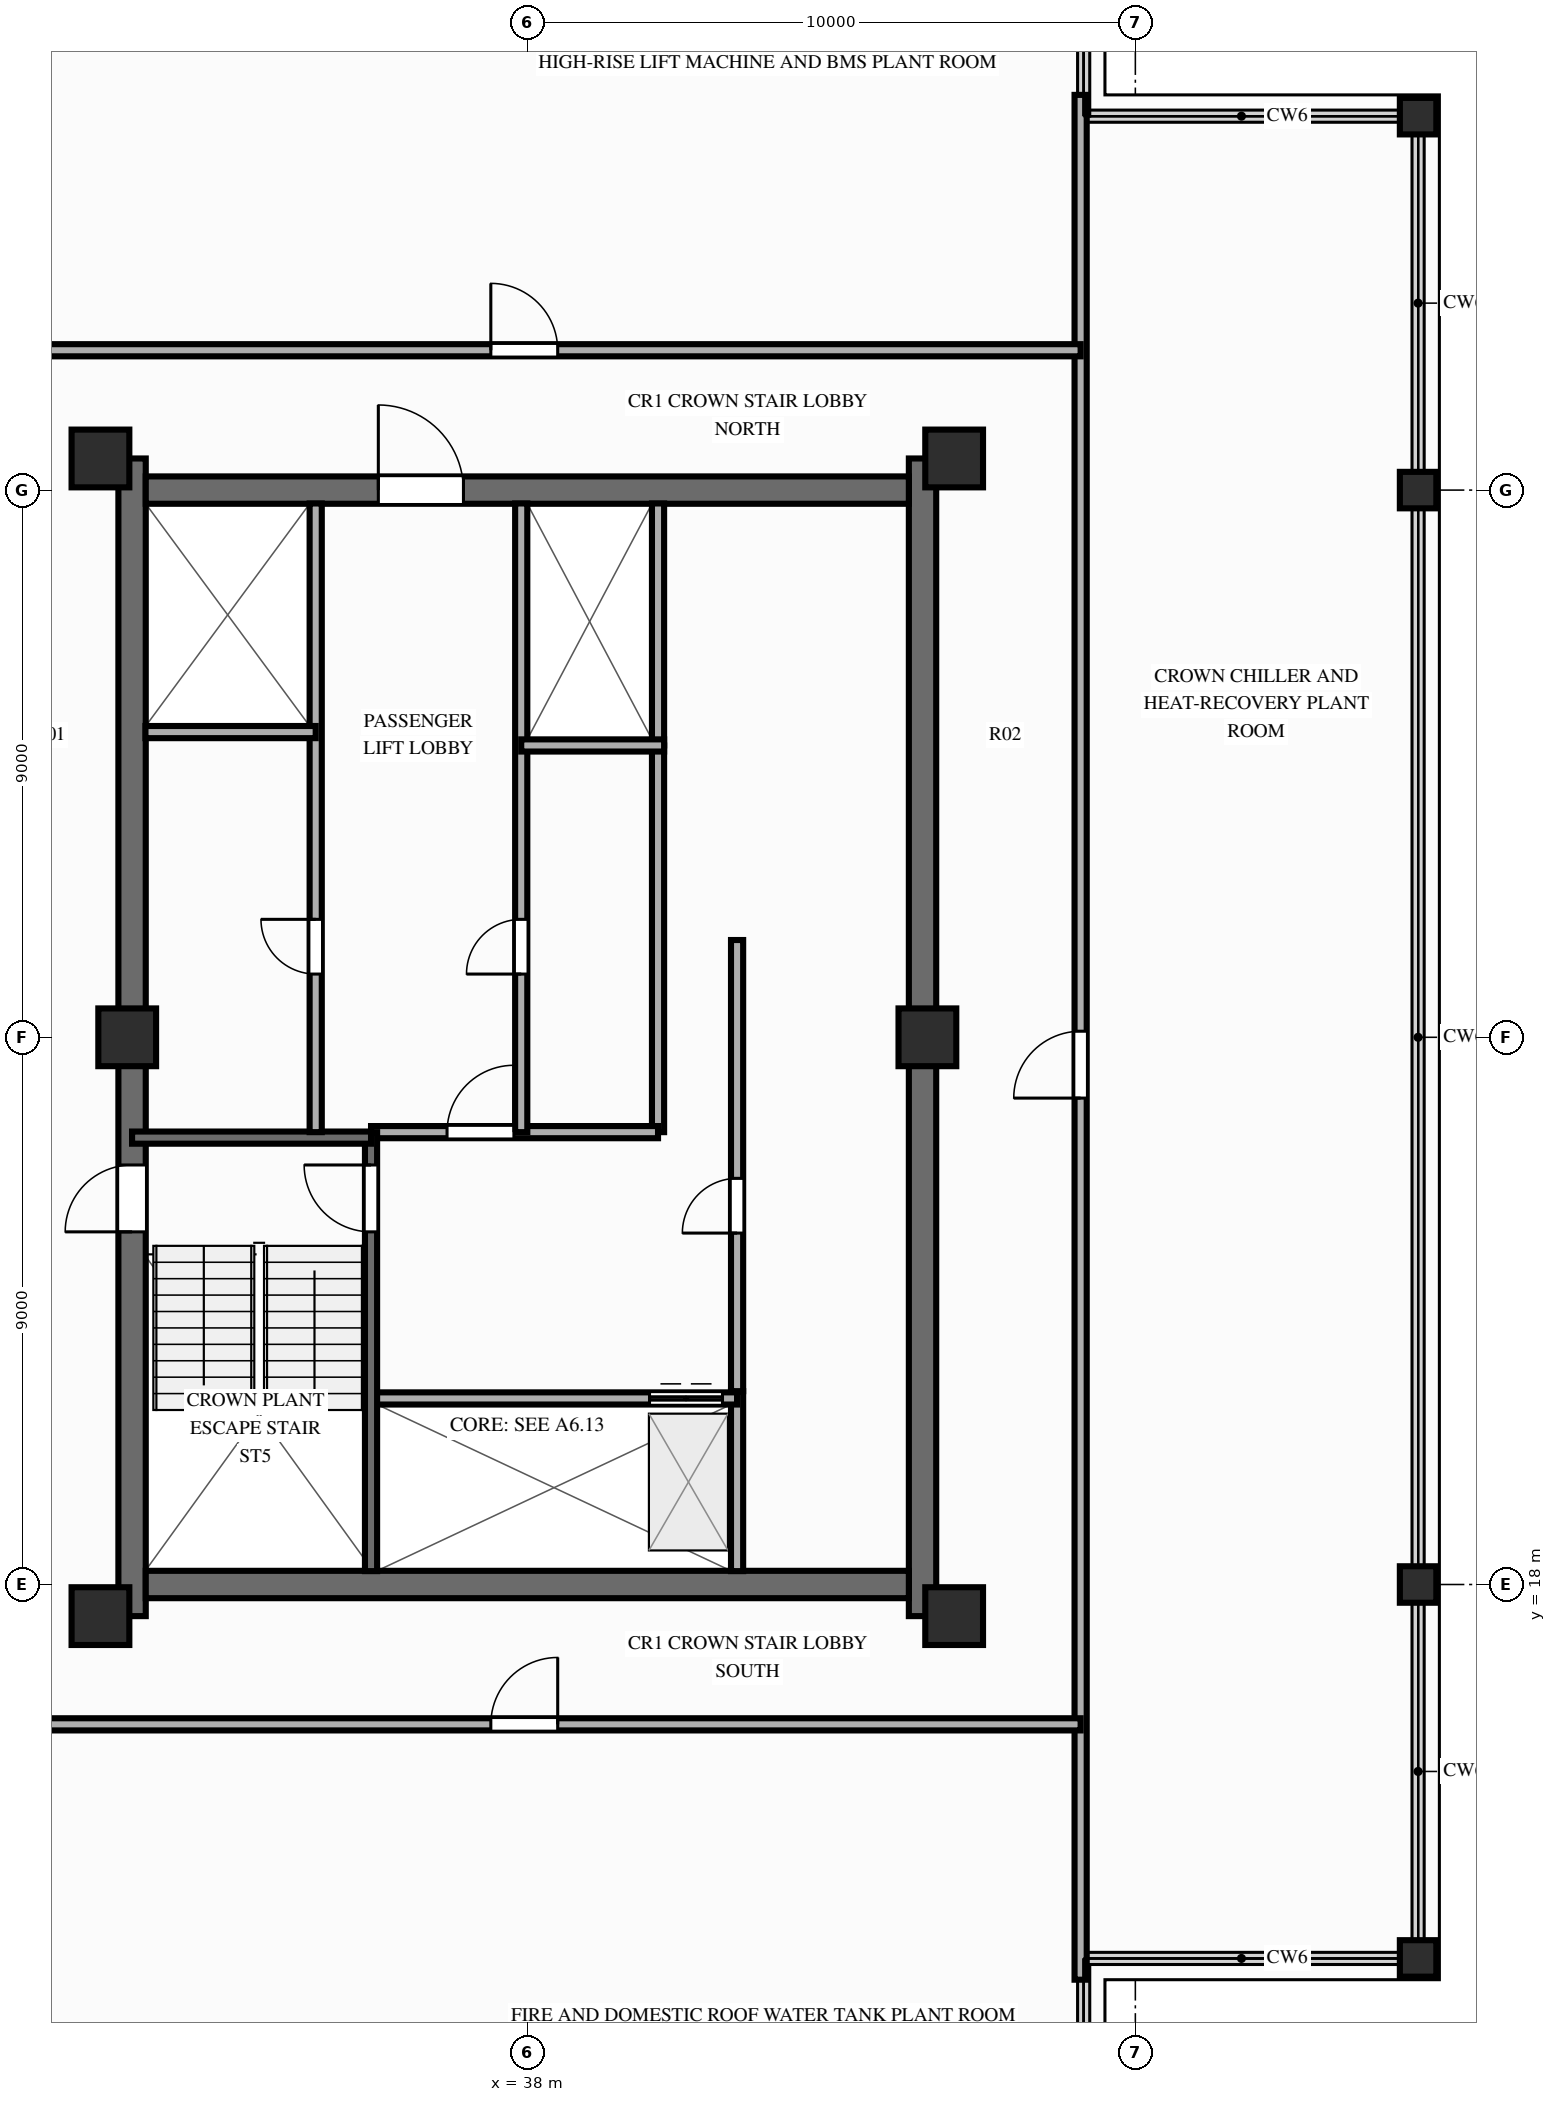
"""IFC4 building model, lengths in metres.
Left out: names, types, materials, properties, quantities, classifications, styles, units other than length and angle.
Written with IfcOpenShell. Run it as: python <this file> out.ifc"""

import sys

from ifc_helpers import new_model, si_unit, direction, frame, frame_2d, origin, origin_2d, place, context, subcontext, project, spatial, rectangle, extrude, source, transform, mapped, element, fill, save


model = new_model("IFC4")
c1 = context("Model", 3, precision=1e-05, world=origin(), true_north=direction((0.0, 1.0)))
c2 = subcontext(c1, "Body", "Model", "MODEL_VIEW")
j1 = project(units=[si_unit("LENGTHUNIT", "METRE"), si_unit("PLANEANGLEUNIT", "RADIAN")], contexts=[c1])
p1 = place(None, origin())
s1 = spatial("IfcSite", under=j1, at=p1, CompositionType="ELEMENT")
p2 = place(p1, origin())
s2 = spatial("IfcBuilding", under=s1, at=p2, CompositionType="ELEMENT")
p3 = place(p2, frame((0.0, 0.0, 252.2)))
s3 = spatial("IfcBuildingStorey", under=s2, at=p3, CompositionType="ELEMENT", Elevation=252.2)
p4 = place(p3, frame((31.5, 17.48, 0.0), z_axis=(0.0, 0.0, 1.0), x_axis=(0.0, 1.0, 0.0)))
e1 = element("IfcWall", 1, at=p4, inside=s3, PredefinedType="SHEAR", context=c2, shape_type="SweptSolid", body=[
    extrude(rectangle(XDim=19.04, YDim=0.45, at=frame_2d((9.52, 0.0))), origin(), (0.0, 0.0, 1.0), 3.8),
])
p5 = place(p4, frame((6.32, 0.0, 0.0)))
e2 = element("IfcOpeningElement", 2, at=p5, cuts=e1, PredefinedType="OPENING", context=c2, shape_type="SweptSolid", body=[
    extrude(rectangle(XDim=1.1, YDim=2.15, at=frame_2d((0.55, 1.075))), frame((0.0, 0.237, 0.0), z_axis=(0.0, -1.0, 0.0), x_axis=(1.0, 0.0, 0.0)), (0.0, 0.0, 1.0), 0.474),
])
p6 = place(p3, frame((44.5, 17.48, 0.0), z_axis=(0.0, 0.0, 1.0), x_axis=(0.0, 1.0, 0.0)))
e3 = element("IfcWall", 3, at=p6, inside=s3, PredefinedType="SHEAR", context=c2, shape_type="SweptSolid", body=[
    extrude(rectangle(XDim=19.04, YDim=0.45, at=frame_2d((9.52, 0.0))), origin(), (0.0, 0.0, 1.0), 3.8),
])
p7 = place(p3, frame((31.725, 18.0, 0.0), z_axis=(0.0, 0.0, 1.0), x_axis=(1.0, 0.0, 0.0)))
e4 = element("IfcWall", 4, at=p7, inside=s3, PredefinedType="SHEAR", context=c2, shape_type="SweptSolid", body=[
    extrude(rectangle(XDim=12.55, YDim=0.45, at=frame_2d((6.275, 0.0))), origin(), (0.0, 0.0, 1.0), 3.8),
])
p8 = place(p3, frame((31.725, 36.0, 0.0), z_axis=(0.0, 0.0, 1.0), x_axis=(1.0, 0.0, 0.0)))
e5 = element("IfcWall", 5, at=p8, inside=s3, PredefinedType="SHEAR", context=c2, shape_type="SweptSolid", body=[
    extrude(rectangle(XDim=12.55, YDim=0.45, at=frame_2d((6.275, 0.0))), origin(), (0.0, 0.0, 1.0), 3.8),
])
p9 = place(p8, frame((5.225, 0.0, 0.0), z_axis=(0.0, 0.0, 1.0), x_axis=(-1.0, 0.0, 0.0)))
e6 = element("IfcOpeningElement", 6, at=p9, cuts=e5, PredefinedType="OPENING", context=c2, shape_type="SweptSolid", body=[
    extrude(rectangle(XDim=1.4, YDim=2.15, at=frame_2d((0.7, 1.075))), frame((0.0, 0.237, 0.0), z_axis=(0.0, -1.0, 0.0), x_axis=(1.0, 0.0, 0.0)), (0.0, 0.0, 1.0), 0.474),
])
m1 = source(origin(), c2, "Body", "SweptSolid", [
    extrude(rectangle(XDim=0.95, YDim=0.95, at=origin_2d()), origin(), (0.0, 0.0, 1.0), 3.8),
])
for number, where, z_axis, x_axis in (
    (7, (30.98, 17.48, 0.0), (0.0, 0.0, 1.0), (1.0, 0.0, 0.0)),
    (8, (45.02, 17.48, 0.0), (0.0, 0.0, 1.0), (1.0, 0.0, 0.0)),
    (9, (30.98, 36.52, 0.0), (0.0, 0.0, 1.0), (1.0, 0.0, 0.0)),
    (10, (45.02, 36.52, 0.0), (0.0, 0.0, 1.0), (1.0, 0.0, 0.0)),
    (11, (31.42, 27.0, 0.0), (0.0, 0.0, 1.0), (1.0, 0.0, 0.0)),
    (12, (44.58, 27.0, 0.0), (0.0, 0.0, 1.0), (1.0, 0.0, 0.0)),
):
    element("IfcColumn", number, at=place(p3, frame(where, z_axis=z_axis, x_axis=x_axis)), inside=s3, PredefinedType="COLUMN", context=c2, shape_type="MappedRepresentation", body=[
        mapped(m1, transform((0.0, 0.0, 0.0), scale=1.0)),
    ])
m2 = source(origin(), c2, "Body", "SweptSolid", [
    extrude(rectangle(XDim=0.6, YDim=0.6, at=origin_2d()), origin(), (0.0, 0.0, 1.0), 3.8),
])
for number, where, z_axis, x_axis in (
    (13, (52.65, 11.85, 0.0), (0.0, 0.0, 1.0), (1.0, 0.0, 0.0)),
    (14, (52.65, 18.0, 0.0), (0.0, 0.0, 1.0), (1.0, 0.0, 0.0)),
    (15, (52.65, 36.0, 0.0), (0.0, 0.0, 1.0), (1.0, 0.0, 0.0)),
    (16, (52.65, 42.15, 0.0), (0.0, 0.0, 1.0), (1.0, 0.0, 0.0)),
):
    element("IfcColumn", number, at=place(p3, frame(where, z_axis=z_axis, x_axis=x_axis)), inside=s3, PredefinedType="COLUMN", context=c2, shape_type="MappedRepresentation", body=[
        mapped(m2, transform((0.0, 0.0, 0.0), scale=1.0)),
    ])
p10 = place(p3, frame((41.45, 18.22, 0.0), z_axis=(0.0, 0.0, 1.0), x_axis=(0.0, 1.0, 0.0)))
e17 = element("IfcWall", 17, at=p10, inside=s3, PredefinedType="PARTITIONING", context=c2, shape_type="SweptSolid", body=[
    extrude(rectangle(XDim=2.96, YDim=0.2, at=frame_2d((1.48, 0.0))), origin(), (0.0, 0.0, 1.0), 3.55),
])
p11 = place(p3, frame((41.45, 21.18, 0.0), z_axis=(0.0, 0.0, 1.0), x_axis=(0.0, 1.0, 0.0)))
e18 = element("IfcWall", 18, at=p11, inside=s3, PredefinedType="PARTITIONING", context=c2, shape_type="SweptSolid", body=[
    extrude(rectangle(XDim=7.42, YDim=0.2, at=frame_2d((3.71, 0.0))), origin(), (0.0, 0.0, 1.0), 3.55),
])
p12 = place(p11, frame((2.6, 0.0, 0.0)))
e19 = element("IfcOpeningElement", 19, at=p12, cuts=e18, PredefinedType="OPENING", context=c2, shape_type="SweptSolid", body=[
    extrude(rectangle(XDim=0.9, YDim=2.1, at=frame_2d((0.45, 1.05))), frame((0.0, 0.112, 0.0), z_axis=(0.0, -1.0, 0.0), x_axis=(1.0, 0.0, 0.0)), (0.0, 0.0, 1.0), 0.224),
])
p13 = place(p3, frame((40.15, 25.44, 0.0), z_axis=(0.0, 0.0, 1.0), x_axis=(0.0, 1.0, 0.0)))
e20 = element("IfcWall", 20, at=p13, inside=s3, PredefinedType="PARTITIONING", context=c2, shape_type="SweptSolid", body=[
    extrude(rectangle(XDim=6.36, YDim=0.2, at=frame_2d((3.18, 0.0))), origin(), (0.0, 0.0, 1.0), 3.55),
])
p14 = place(p3, frame((40.15, 31.8, 0.0), z_axis=(0.0, 0.0, 1.0), x_axis=(0.0, 1.0, 0.0)))
e21 = element("IfcWall", 21, at=p14, inside=s3, PredefinedType="PARTITIONING", context=c2, shape_type="SweptSolid", body=[
    extrude(rectangle(XDim=3.98, YDim=0.2, at=frame_2d((1.99, 0.0))), origin(), (0.0, 0.0, 1.0), 3.55),
])
p15 = place(p3, frame((35.43, 21.06, 0.0), z_axis=(0.0, 0.0, 1.0), x_axis=(1.0, 0.0, 0.0)))
e22 = element("IfcWall", 22, at=p15, inside=s3, PredefinedType="PARTITIONING", context=c2, shape_type="SweptSolid", body=[
    extrude(rectangle(XDim=6.02, YDim=0.2, at=frame_2d((3.01, 0.0))), origin(), (0.0, 0.0, 1.0), 3.55),
])
p16 = place(p15, frame((4.58, 0.0, 0.0)))
e23 = element("IfcOpeningElement", 23, at=p16, cuts=e22, PredefinedType="OPENING", context=c2, shape_type="SweptSolid", body=[
    extrude(rectangle(XDim=1.2, YDim=2.15, at=frame_2d((0.6, 1.075))), frame((0.0, 0.112, 0.0), z_axis=(0.0, -1.0, 0.0), x_axis=(1.0, 0.0, 0.0)), (0.0, 0.0, 1.0), 0.224),
])
p17 = place(p3, frame((35.43, 25.44, 0.0), z_axis=(0.0, 0.0, 1.0), x_axis=(1.0, 0.0, 0.0)))
e24 = element("IfcWall", 24, at=p17, inside=s3, PredefinedType="PARTITIONING", context=c2, shape_type="SweptSolid", body=[
    extrude(rectangle(XDim=4.72, YDim=0.2, at=frame_2d((2.36, 0.0))), origin(), (0.0, 0.0, 1.0), 2.952),
])
p18 = place(p17, frame((1.25, 0.0, 0.0)))
e25 = element("IfcOpeningElement", 25, at=p18, cuts=e24, PredefinedType="OPENING", context=c2, shape_type="SweptSolid", body=[
    extrude(rectangle(XDim=1.1, YDim=2.15, at=frame_2d((0.55, 1.075))), frame((0.0, 0.112, 0.0), z_axis=(0.0, -1.0, 0.0), x_axis=(1.0, 0.0, 0.0)), (0.0, 0.0, 1.0), 0.224),
])
p19 = place(p3, frame((35.43, 18.22, 0.0), z_axis=(0.0, 0.0, 1.0), x_axis=(0.0, 1.0, 0.0)))
e26 = element("IfcWall", 26, at=p19, inside=s3, PredefinedType="SOLIDWALL", context=c2, shape_type="SweptSolid", body=[
    extrude(rectangle(XDim=7.22, YDim=0.2, at=frame_2d((3.61, 0.0))), origin(), (0.0, 0.0, 1.0), 3.55),
])
p20 = place(p19, frame((6.68, 0.0, 0.0), z_axis=(0.0, 0.0, 1.0), x_axis=(-1.0, 0.0, 0.0)))
e27 = element("IfcOpeningElement", 27, at=p20, cuts=e26, PredefinedType="OPENING", context=c2, shape_type="SweptSolid", body=[
    extrude(rectangle(XDim=1.1, YDim=2.15, at=frame_2d((0.55, 1.075))), frame((0.0, 0.112, 0.0), z_axis=(0.0, -1.0, 0.0), x_axis=(1.0, 0.0, 0.0)), (0.0, 0.0, 1.0), 0.224),
])
p21 = place(p3, frame((31.5, 25.35, 0.0), z_axis=(0.0, 0.0, 1.0), x_axis=(1.0, 0.0, 0.0)))
e28 = element("IfcWall", 28, at=p21, inside=s3, PredefinedType="SOLIDWALL", context=c2, shape_type="SweptSolid", body=[
    extrude(rectangle(XDim=3.93, YDim=0.2, at=frame_2d((1.965, 0.0))), origin(), (0.0, 0.0, 1.0), 3.55),
])
p22 = place(p3, frame((34.52, 25.44, 0.0), z_axis=(0.0, 0.0, 1.0), x_axis=(0.0, 1.0, 0.0)))
e29 = element("IfcWall", 29, at=p22, inside=s3, PredefinedType="PARTITIONING", context=c2, shape_type="SweptSolid", body=[
    extrude(rectangle(XDim=10.34, YDim=0.2, at=frame_2d((5.17, 0.0))), origin(), (0.0, 0.0, 1.0), 3.55),
])
p23 = place(p22, frame((2.6, 0.0, 0.0)))
e30 = element("IfcOpeningElement", 30, at=p23, cuts=e29, PredefinedType="OPENING", context=c2, shape_type="SweptSolid", body=[
    extrude(rectangle(XDim=0.9, YDim=2.1, at=frame_2d((0.45, 1.05))), frame((0.0, 0.112, 0.0), z_axis=(0.0, -1.0, 0.0), x_axis=(1.0, 0.0, 0.0)), (0.0, 0.0, 1.0), 0.224),
])
p24 = place(p3, frame((31.72, 32.02, 0.0), z_axis=(0.0, 0.0, 1.0), x_axis=(1.0, 0.0, 0.0)))
e31 = element("IfcWall", 31, at=p24, inside=s3, PredefinedType="PARTITIONING", context=c2, shape_type="SweptSolid", body=[
    extrude(rectangle(XDim=2.8, YDim=0.2, at=frame_2d((1.4, 0.0))), origin(), (0.0, 0.0, 1.0), 3.55),
])
p25 = place(p3, frame((37.9, 25.44, 0.0), z_axis=(0.0, 0.0, 1.0), x_axis=(0.0, 1.0, 0.0)))
e32 = element("IfcWall", 32, at=p25, inside=s3, PredefinedType="PARTITIONING", context=c2, shape_type="SweptSolid", body=[
    extrude(rectangle(XDim=10.34, YDim=0.2, at=frame_2d((5.17, 0.0))), origin(), (0.0, 0.0, 1.0), 3.55),
])
p26 = place(p25, frame((2.6, 0.0, 0.0)))
e33 = element("IfcOpeningElement", 33, at=p26, cuts=e32, PredefinedType="OPENING", context=c2, shape_type="SweptSolid", body=[
    extrude(rectangle(XDim=0.9, YDim=2.1, at=frame_2d((0.45, 1.05))), frame((0.0, 0.112, 0.0), z_axis=(0.0, -1.0, 0.0), x_axis=(1.0, 0.0, 0.0)), (0.0, 0.0, 1.0), 0.224),
])
p27 = place(p3, frame((37.9, 31.8, 0.0), z_axis=(0.0, 0.0, 1.0), x_axis=(1.0, 0.0, 0.0)))
e34 = element("IfcWall", 34, at=p27, inside=s3, PredefinedType="PARTITIONING", context=c2, shape_type="SweptSolid", body=[
    extrude(rectangle(XDim=2.35, YDim=0.2, at=frame_2d((1.175, 0.0))), origin(), (0.0, 0.0, 1.0), 3.55),
])
p28 = place(p3, frame((47.1, 11.5, 0.0), z_axis=(0.0, 0.0, 1.0), x_axis=(0.0, 1.0, 0.0)))
e35 = element("IfcWall", 35, at=p28, inside=s3, PredefinedType="PARTITIONING", context=c2, shape_type="SweptSolid", body=[
    extrude(rectangle(XDim=31.0, YDim=0.2, at=frame_2d((15.5, 0.0))), origin(), (0.0, 0.0, 1.0), 3.55),
])
p29 = place(p28, frame((14.5, 0.0, 0.0)))
e36 = element("IfcOpeningElement", 36, at=p29, cuts=e35, PredefinedType="OPENING", context=c2, shape_type="SweptSolid", body=[
    extrude(rectangle(XDim=1.1, YDim=2.15, at=frame_2d((0.55, 1.075))), frame((0.0, 0.112, 0.0), z_axis=(0.0, -1.0, 0.0), x_axis=(1.0, 0.0, 0.0)), (0.0, 0.0, 1.0), 0.224),
])
p30 = place(p3, frame((28.9, 15.7, 0.0), z_axis=(0.0, 0.0, 1.0), x_axis=(1.0, 0.0, 0.0)))
e37 = element("IfcWall", 37, at=p30, inside=s3, PredefinedType="PARTITIONING", context=c2, shape_type="SweptSolid", body=[
    extrude(rectangle(XDim=18.2, YDim=0.2, at=frame_2d((9.1, 0.0))), origin(), (0.0, 0.0, 1.0), 3.55),
])
p31 = place(p30, frame((8.5, 0.0, 0.0)))
e38 = element("IfcOpeningElement", 38, at=p31, cuts=e37, PredefinedType="OPENING", context=c2, shape_type="SweptSolid", body=[
    extrude(rectangle(XDim=1.1, YDim=2.15, at=frame_2d((0.55, 1.075))), frame((0.0, 0.112, 0.0), z_axis=(0.0, -1.0, 0.0), x_axis=(1.0, 0.0, 0.0)), (0.0, 0.0, 1.0), 0.224),
])
p32 = place(p3, frame((28.9, 38.3, 0.0), z_axis=(0.0, 0.0, 1.0), x_axis=(1.0, 0.0, 0.0)))
e39 = element("IfcWall", 39, at=p32, inside=s3, PredefinedType="PARTITIONING", context=c2, shape_type="SweptSolid", body=[
    extrude(rectangle(XDim=18.2, YDim=0.2, at=frame_2d((9.1, 0.0))), origin(), (0.0, 0.0, 1.0), 3.55),
])
p33 = place(p32, frame((8.5, 0.0, 0.0)))
e40 = element("IfcOpeningElement", 40, at=p33, cuts=e39, PredefinedType="OPENING", context=c2, shape_type="SweptSolid", body=[
    extrude(rectangle(XDim=1.1, YDim=2.15, at=frame_2d((0.55, 1.075))), frame((0.0, 0.112, 0.0), z_axis=(0.0, -1.0, 0.0), x_axis=(1.0, 0.0, 0.0)), (0.0, 0.0, 1.0), 0.224),
])
m3 = source(origin(), c2, "Body", "SweptSolid", [
    extrude(rectangle(XDim=1.1, YDim=2.15, at=frame_2d((0.55, 1.075))), frame((0.0, 0.025, 0.0), z_axis=(0.0, -1.0, 0.0), x_axis=(1.0, 0.0, 0.0)), (0.0, 0.0, 1.0), 0.05),
])
p34 = place(p5, origin())
e41 = element("IfcDoor", 41, at=p34, inside=s3, OperationType="SINGLE_SWING_LEFT", PredefinedType="DOOR", context=c2, shape_type="MappedRepresentation", body=[
    mapped(m3, transform((0.0, 0.0, 0.0), scale=1.0)),
])
fill(e2, e41)
m4 = source(origin(), c2, "Body", "SweptSolid", [
    extrude(rectangle(XDim=1.4, YDim=2.15, at=frame_2d((0.7, 1.075))), frame((0.0, 0.025, 0.0), z_axis=(0.0, -1.0, 0.0), x_axis=(1.0, 0.0, 0.0)), (0.0, 0.0, 1.0), 0.05),
])
p35 = place(p9, origin())
e42 = element("IfcDoor", 42, at=p35, inside=s3, OperationType="SINGLE_SWING_RIGHT", PredefinedType="DOOR", context=c2, shape_type="MappedRepresentation", body=[
    mapped(m4, transform((0.0, 0.0, 0.0), scale=1.0)),
])
fill(e6, e42)
m5 = source(origin(), c2, "Body", "SweptSolid", [
    extrude(rectangle(XDim=0.9, YDim=2.1, at=frame_2d((0.45, 1.05))), frame((0.0, 0.025, 0.0), z_axis=(0.0, -1.0, 0.0), x_axis=(1.0, 0.0, 0.0)), (0.0, 0.0, 1.0), 0.05),
])
p36 = place(p12, origin())
e43 = element("IfcDoor", 43, at=p36, inside=s3, OperationType="SINGLE_SWING_LEFT", PredefinedType="DOOR", context=c2, shape_type="MappedRepresentation", body=[
    mapped(m5, transform((0.0, 0.0, 0.0), scale=1.0)),
])
fill(e19, e43)
m6 = source(origin(), c2, "Body", "SweptSolid", [
    extrude(rectangle(XDim=1.2, YDim=2.15, at=frame_2d((0.6, 1.075))), frame((0.0, 0.025, 0.0), z_axis=(0.0, -1.0, 0.0), x_axis=(1.0, 0.0, 0.0)), (0.0, 0.0, 1.0), 0.05),
])
p37 = place(p16, origin())
e44 = element("IfcDoor", 44, at=p37, inside=s3, OperationType="DOUBLE_DOOR_SLIDING", PredefinedType="DOOR", context=c2, shape_type="MappedRepresentation", body=[
    mapped(m6, transform((0.0, 0.0, 0.0), scale=1.0)),
])
fill(e23, e44)
p38 = place(p18, origin())
e45 = element("IfcDoor", 45, at=p38, inside=s3, OperationType="SINGLE_SWING_RIGHT", PredefinedType="DOOR", context=c2, shape_type="MappedRepresentation", body=[
    mapped(m3, transform((0.0, 0.0, 0.0), scale=1.0)),
])
fill(e25, e45)
p39 = place(p20, origin())
e46 = element("IfcDoor", 46, at=p39, inside=s3, OperationType="SINGLE_SWING_LEFT", PredefinedType="DOOR", context=c2, shape_type="MappedRepresentation", body=[
    mapped(m3, transform((0.0, 0.0, 0.0), scale=1.0)),
])
fill(e27, e46)
p40 = place(p23, origin())
e47 = element("IfcDoor", 47, at=p40, inside=s3, OperationType="SINGLE_SWING_RIGHT", PredefinedType="DOOR", context=c2, shape_type="MappedRepresentation", body=[
    mapped(m5, transform((0.0, 0.0, 0.0), scale=1.0)),
])
fill(e30, e47)
p41 = place(p26, origin())
e48 = element("IfcDoor", 48, at=p41, inside=s3, OperationType="SINGLE_SWING_LEFT", PredefinedType="DOOR", context=c2, shape_type="MappedRepresentation", body=[
    mapped(m5, transform((0.0, 0.0, 0.0), scale=1.0)),
])
fill(e33, e48)
p42 = place(p29, origin())
e49 = element("IfcDoor", 49, at=p42, inside=s3, OperationType="SINGLE_SWING_LEFT", PredefinedType="DOOR", context=c2, shape_type="MappedRepresentation", body=[
    mapped(m3, transform((0.0, 0.0, 0.0), scale=1.0)),
])
fill(e36, e49)
p43 = place(p31, origin())
e50 = element("IfcDoor", 50, at=p43, inside=s3, OperationType="SINGLE_SWING_RIGHT", PredefinedType="DOOR", context=c2, shape_type="MappedRepresentation", body=[
    mapped(m3, transform((0.0, 0.0, 0.0), scale=1.0)),
])
fill(e38, e50)
p44 = place(p33, origin())
e51 = element("IfcDoor", 51, at=p44, inside=s3, OperationType="SINGLE_SWING_LEFT", PredefinedType="DOOR", context=c2, shape_type="MappedRepresentation", body=[
    mapped(m3, transform((0.0, 0.0, 0.0), scale=1.0)),
])
fill(e40, e51)
save(model, sys.argv[1])
